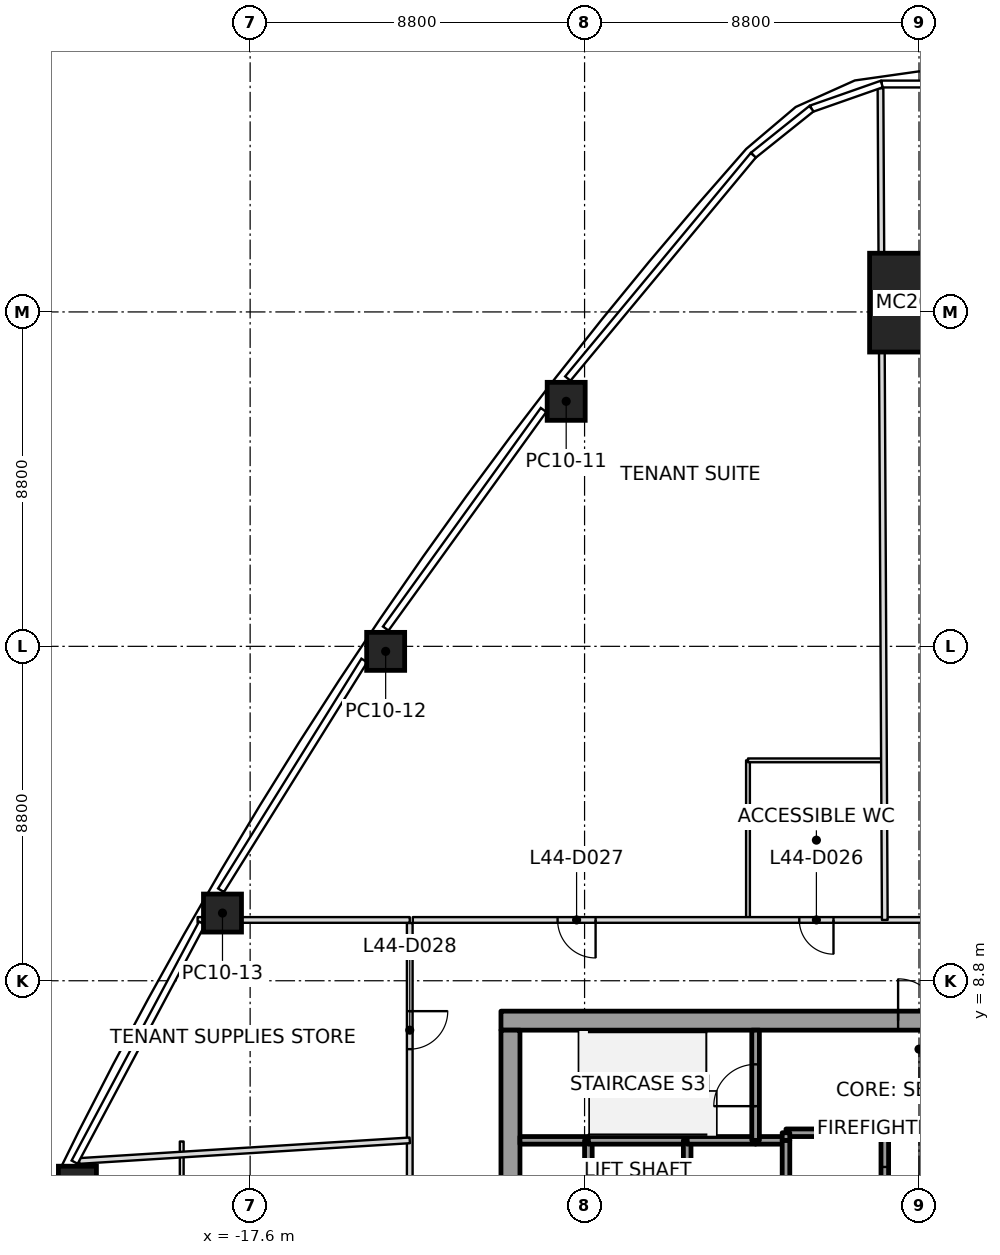
"""IFC4 building model, lengths in metres.
Left out: names, types, materials, properties, quantities, classifications, styles, units other than length and angle.
Written with IfcOpenShell. Run it as: python <this file> out.ifc"""

import sys

from ifc_helpers import new_model, si_unit, direction, frame, frame_2d, origin, origin_2d, place, context, subcontext, project, spatial, rectangle, extrude, element, fill, save


model = new_model("IFC4")
c1 = context("Model", 3, precision=1e-05, world=origin(), true_north=direction((0.0, 1.0)))
c2 = subcontext(c1, "Body", "Model", "MODEL_VIEW")
j1 = project(units=[si_unit("LENGTHUNIT", "METRE"), si_unit("PLANEANGLEUNIT", "RADIAN")], contexts=[c1])
p1 = place(None, origin())
s1 = spatial("IfcSite", under=j1, at=p1, CompositionType="ELEMENT")
p2 = place(p1, origin())
s2 = spatial("IfcBuilding", under=s1, at=p2, CompositionType="ELEMENT")
p3 = place(p2, frame((0.0, 0.0, 197.8)))
s3 = spatial("IfcBuildingStorey", under=s2, at=p3, CompositionType="ELEMENT", Elevation=197.8)
p4 = place(p3, frame((0.0, 26.645, 0.0), z_axis=(0.0, -0.032331720729, 0.999477193254), x_axis=(1.0, 0.0, 0.0)))
e1 = element("IfcColumn", 1, at=p4, inside=s3, PredefinedType="COLUMN", context=c2, shape_type="SweptSolid", body=[
    extrude(rectangle(XDim=2.6, YDim=2.6, at=origin_2d()), origin(), (0.0, 0.0, 1.0), 4.002),
])
p5 = place(p3, frame((-9.284, 24.048, 0.0), z_axis=(0.000183067202, -0.020442504242, 0.999791013416), x_axis=(0.612482198011, 0.790321478111, 0.016047378453)))
e2 = element("IfcColumn", 2, at=p5, inside=s3, PredefinedType="COLUMN", context=c2, shape_type="SweptSolid", body=[
    extrude(rectangle(XDim=1.0, YDim=1.0, at=origin_2d()), origin(), (0.0, 0.0, 1.0), 4.001),
])
p6 = place(p3, frame((-14.034, 17.468, 0.0), z_axis=(0.005248490815, -0.013243284963, 0.999898529226), x_axis=(0.557514318563, 0.830128114569, 0.008068333097)))
e3 = element("IfcColumn", 3, at=p6, inside=s3, PredefinedType="COLUMN", context=c2, shape_type="SweptSolid", body=[
    extrude(rectangle(XDim=1.0, YDim=1.0, at=origin_2d()), origin(), (0.0, 0.0, 1.0), 4.0),
])
p7 = place(p3, frame((-18.328, 10.581, 0.0), z_axis=(0.009887052741, -0.005675900648, 0.999935013058), x_axis=(0.49997556095, 0.866039512773, -2.7732311e-05)))
e4 = element("IfcColumn", 4, at=p7, inside=s3, PredefinedType="COLUMN", context=c2, shape_type="SweptSolid", body=[
    extrude(rectangle(XDim=1.0, YDim=1.0, at=origin_2d()), origin(), (0.0, 0.0, 1.0), 4.0),
])
p8 = place(p3, frame((-22.145, 3.42, 0.0), z_axis=(0.014097691364, 0.002013955909, 0.999898594398), x_axis=(0.440136782455, 0.897894975927, -0.008014046079)))
e5 = element("IfcColumn", 5, at=p8, inside=s3, PredefinedType="COLUMN", context=c2, shape_type="SweptSolid", body=[
    extrude(rectangle(XDim=1.0, YDim=1.0, at=origin_2d()), origin(), (0.0, 0.0, 1.0), 4.0),
])
p9 = place(p3, frame((-11.0, 7.75, 0.0), z_axis=(0.0, 0.0, 1.0), x_axis=(1.0, 0.0, 0.0)))
e6 = element("IfcWall", 6, at=p9, inside=s3, PredefinedType="SHEAR", context=c2, shape_type="SweptSolid", body=[
    extrude(rectangle(XDim=22.0, YDim=0.5, at=frame_2d((11.0, 0.0))), origin(), (0.0, 0.0, 1.0), 4.0),
])
p10 = place(p9, frame((10.45, 0.0, 0.0)))
e7 = element("IfcOpeningElement", 7, at=p10, cuts=e6, PredefinedType="OPENING", context=c2, shape_type="SweptSolid", body=[
    extrude(rectangle(XDim=1.1, YDim=2.1, at=frame_2d((0.55, 1.05))), frame((0.0, 0.25, 0.0), z_axis=(0.0, -1.0, 0.0), x_axis=(1.0, 0.0, 0.0)), (0.0, 0.0, 1.0), 0.5),
])
p11 = place(p3, frame((-10.75, -7.5, 0.0), z_axis=(0.0, 0.0, 1.0), x_axis=(0.0, 1.0, 0.0)))
e8 = element("IfcWall", 8, at=p11, inside=s3, PredefinedType="SHEAR", context=c2, shape_type="SweptSolid", body=[
    extrude(rectangle(XDim=15.0, YDim=0.5, at=frame_2d((7.5, 0.0))), origin(), (0.0, 0.0, 1.0), 4.0),
])
p12 = place(p11, frame((6.6, 0.0, 0.0)))
e9 = element("IfcOpeningElement", 9, at=p12, cuts=e8, PredefinedType="OPENING", context=c2, shape_type="SweptSolid", body=[
    extrude(rectangle(XDim=1.8, YDim=2.1, at=frame_2d((0.9, 1.05))), frame((0.0, 0.25, 0.0), z_axis=(0.0, -1.0, 0.0), x_axis=(1.0, 0.0, 0.0)), (0.0, 0.0, 1.0), 0.5),
])
p13 = place(p3, frame((-8.7, 4.6, 0.0), z_axis=(0.0, 0.0, 1.0), x_axis=(-1.0, 0.0, 0.0)))
e10 = element("IfcWall", 10, at=p13, inside=s3, PredefinedType="SOLIDWALL", context=c2, shape_type="SweptSolid", body=[
    extrude(rectangle(XDim=1.8, YDim=0.2, at=frame_2d((0.9, 0.0))), origin(), (0.0, 0.0, 1.0), 3.85),
])
p14 = place(p3, frame((-8.7, 1.8, 0.0), z_axis=(0.0, 0.0, 1.0), x_axis=(0.0, 1.0, 0.0)))
e11 = element("IfcWall", 11, at=p14, inside=s3, PredefinedType="SOLIDWALL", context=c2, shape_type="SweptSolid", body=[
    extrude(rectangle(XDim=2.8, YDim=0.2, at=frame_2d((1.4, 0.0))), origin(), (0.0, 0.0, 1.0), 3.85),
])
p15 = place(p3, frame((-6.1, 4.6, 0.0), z_axis=(0.0, 0.0, 1.0), x_axis=(-1.0, 0.0, 0.0)))
e12 = element("IfcWall", 12, at=p15, inside=s3, PredefinedType="SOLIDWALL", context=c2, shape_type="SweptSolid", body=[
    extrude(rectangle(XDim=2.6, YDim=0.2, at=frame_2d((1.3, 0.0))), origin(), (0.0, 0.0, 1.0), 3.85),
])
p16 = place(p3, frame((-6.1, 1.8, 0.0), z_axis=(0.0, 0.0, 1.0), x_axis=(0.0, 1.0, 0.0)))
e13 = element("IfcWall", 13, at=p16, inside=s3, PredefinedType="SOLIDWALL", context=c2, shape_type="SweptSolid", body=[
    extrude(rectangle(XDim=2.8, YDim=0.2, at=frame_2d((1.4, 0.0))), origin(), (0.0, 0.0, 1.0), 3.85),
])
p17 = place(p3, frame((-4.3, 4.6, 0.0), z_axis=(0.0, 0.0, 1.0), x_axis=(-1.0, 0.0, 0.0)))
e14 = element("IfcWall", 14, at=p17, inside=s3, PredefinedType="SOLIDWALL", context=c2, shape_type="SweptSolid", body=[
    extrude(rectangle(XDim=1.8, YDim=0.2, at=frame_2d((0.9, 0.0))), origin(), (0.0, 0.0, 1.0), 3.85),
])
p18 = place(p3, frame((-3.5, 4.6, 0.0), z_axis=(0.0, 0.0, 1.0), x_axis=(-1.0, 0.0, 0.0)))
e15 = element("IfcWall", 15, at=p18, inside=s3, PredefinedType="SOLIDWALL", context=c2, shape_type="SweptSolid", body=[
    extrude(rectangle(XDim=0.8, YDim=0.2, at=frame_2d((0.4, 0.0))), origin(), (0.0, 0.0, 1.0), 3.85),
])
p19 = place(p3, frame((-4.3, 4.6, 0.0), z_axis=(0.0, 0.0, 1.0), x_axis=(0.0, 1.0, 0.0)))
e16 = element("IfcWall", 16, at=p19, inside=s3, PredefinedType="SOLIDWALL", context=c2, shape_type="SweptSolid", body=[
    extrude(rectangle(XDim=2.9, YDim=0.2, at=frame_2d((1.45, 0.0))), origin(), (0.0, 0.0, 1.0), 3.85),
])
p20 = place(p19, frame((0.9, 0.0, 0.0)))
e17 = element("IfcOpeningElement", 17, at=p20, cuts=e16, PredefinedType="OPENING", context=c2, shape_type="SweptSolid", body=[
    extrude(rectangle(XDim=1.1, YDim=2.1, at=frame_2d((0.55, 1.05))), frame((0.0, 0.1, 0.0), z_axis=(0.0, -1.0, 0.0), x_axis=(1.0, 0.0, 0.0)), (0.0, 0.0, 1.0), 0.2),
])
p21 = place(p3, frame((-3.5, 4.6, 0.0), z_axis=(0.0, 0.0, 1.0), x_axis=(0.0, -1.0, 0.0)))
e18 = element("IfcWall", 18, at=p21, inside=s3, PredefinedType="SOLIDWALL", context=c2, shape_type="SweptSolid", body=[
    extrude(rectangle(XDim=2.8, YDim=0.2, at=frame_2d((1.4, 0.0))), origin(), (0.0, 0.0, 1.0), 3.85),
])
p22 = place(p3, frame((-0.9, 1.8, 0.0), z_axis=(0.0, 0.0, 1.0), x_axis=(0.0, 1.0, 0.0)))
e19 = element("IfcWall", 19, at=p22, inside=s3, PredefinedType="SOLIDWALL", context=c2, shape_type="SweptSolid", body=[
    extrude(rectangle(XDim=3.0, YDim=0.2, at=frame_2d((1.5, 0.0))), origin(), (0.0, 0.0, 1.0), 3.85),
])
p23 = place(p22, frame((0.9, 0.0, 0.0)))
e20 = element("IfcOpeningElement", 20, at=p23, cuts=e19, PredefinedType="OPENING", context=c2, shape_type="SweptSolid", body=[
    extrude(rectangle(XDim=1.2, YDim=2.1, at=frame_2d((0.6, 1.05))), frame((0.0, 0.1, 0.0), z_axis=(0.0, -1.0, 0.0), x_axis=(1.0, 0.0, 0.0)), (0.0, 0.0, 1.0), 0.2),
])
p24 = place(p3, frame((-0.9, 4.8, 0.0), z_axis=(0.0, 0.0, 1.0), x_axis=(-1.0, 0.0, 0.0)))
e21 = element("IfcWall", 21, at=p24, inside=s3, PredefinedType="SOLIDWALL", context=c2, shape_type="SweptSolid", body=[
    extrude(rectangle(XDim=2.6, YDim=0.2, at=frame_2d((1.3, 0.0))), origin(), (0.0, 0.0, 1.0), 3.85),
])
p25 = place(p3, frame((-3.5, 4.8, 0.0), z_axis=(0.0, 0.0, 1.0), x_axis=(0.0, -1.0, 0.0)))
e22 = element("IfcWall", 22, at=p25, inside=s3, PredefinedType="SOLIDWALL", context=c2, shape_type="SweptSolid", body=[
    extrude(rectangle(XDim=0.2, YDim=0.2, at=frame_2d((0.1, 0.0))), origin(), (0.0, 0.0, 1.0), 3.85),
])
p26 = place(p3, frame((-13.4, 4.6, 0.0), z_axis=(0.0, 0.0, 1.0), x_axis=(-0.998057152045, -0.062305066026, 0.0)))
e23 = element("IfcWall", 23, at=p26, inside=s3, PredefinedType="PARTITIONING", context=c2, shape_type="SweptSolid", body=[
    extrude(rectangle(XDim=8.719, YDim=0.15, at=frame_2d((4.359, 0.0))), origin(), (0.0, 0.0, 1.0), 3.234),
])
p27 = place(p3, frame((-13.4, 10.4, 0.0), z_axis=(0.0, 0.0, 1.0), x_axis=(-1.0, 0.0, 0.0)))
e24 = element("IfcWall", 24, at=p27, inside=s3, PredefinedType="PARTITIONING", context=c2, shape_type="SweptSolid", body=[
    extrude(rectangle(XDim=5.582, YDim=0.15, at=frame_2d((2.791, 0.0))), origin(), (0.0, 0.0, 1.0), 3.45),
])
p28 = place(p3, frame((-0.9, 10.4, 0.0), z_axis=(0.0, 0.0, 1.0), x_axis=(-0.005175902557, 0.999986604927, 0.0)))
e25 = element("IfcWall", 25, at=p28, inside=s3, PredefinedType="PARTITIONING", context=c2, shape_type="SweptSolid", body=[
    extrude(rectangle(XDim=21.886, YDim=0.15, at=frame_2d((10.943, 0.0))), origin(), (0.0, 0.0, 1.0), 3.234),
])
p29 = place(p3, frame((-13.4, 10.32, 0.0), z_axis=(0.0, 0.0, 1.0), x_axis=(0.0, -1.0, 0.0)))
e26 = element("IfcWall", 26, at=p29, inside=s3, PredefinedType="PARTITIONING", context=c2, shape_type="SweptSolid", body=[
    extrude(rectangle(XDim=20.64, YDim=0.15, at=frame_2d((10.32, 0.0))), origin(), (0.0, 0.0, 1.0), 3.166),
])
p30 = place(p29, frame((2.32, 0.0, 0.0)))
e27 = element("IfcOpeningElement", 27, at=p30, cuts=e26, PredefinedType="OPENING", context=c2, shape_type="SweptSolid", body=[
    extrude(rectangle(XDim=1.0, YDim=2.1, at=frame_2d((0.5, 1.05))), frame((0.0, 0.075, 0.0), z_axis=(0.0, -1.0, 0.0), x_axis=(1.0, 0.0, 0.0)), (0.0, 0.0, 1.0), 0.15),
])
p31 = place(p29, frame((7.77, 0.0, 0.0)))
e28 = element("IfcOpeningElement", 28, at=p31, cuts=e26, PredefinedType="OPENING", context=c2, shape_type="SweptSolid", body=[
    extrude(rectangle(XDim=0.9, YDim=2.1, at=frame_2d((0.45, 1.05))), frame((0.0, 0.075, 0.0), z_axis=(0.0, -1.0, 0.0), x_axis=(1.0, 0.0, 0.0)), (0.0, 0.0, 1.0), 0.15),
])
p32 = place(p29, frame((15.28, 0.0, 0.0)))
e29 = element("IfcOpeningElement", 29, at=p32, cuts=e26, PredefinedType="OPENING", context=c2, shape_type="SweptSolid", body=[
    extrude(rectangle(XDim=1.0, YDim=2.1, at=frame_2d((0.5, 1.05))), frame((0.0, 0.075, 0.0), z_axis=(0.0, -1.0, 0.0), x_axis=(1.0, 0.0, 0.0)), (0.0, 0.0, 1.0), 0.15),
])
p33 = place(p3, frame((13.32, 10.4, 0.0), z_axis=(0.0, 0.0, 1.0), x_axis=(-1.0, 0.0, 0.0)))
e30 = element("IfcWall", 30, at=p33, inside=s3, PredefinedType="PARTITIONING", context=c2, shape_type="SweptSolid", body=[
    extrude(rectangle(XDim=26.64, YDim=0.15, at=frame_2d((13.32, 0.0))), origin(), (0.0, 0.0, 1.0), 3.166),
])
p34 = place(p33, frame((1.95, 0.0, 0.0)))
e31 = element("IfcOpeningElement", 31, at=p34, cuts=e30, PredefinedType="OPENING", context=c2, shape_type="SweptSolid", body=[
    extrude(rectangle(XDim=0.9, YDim=2.1, at=frame_2d((0.45, 1.05))), frame((0.0, 0.075, 0.0), z_axis=(0.0, -1.0, 0.0), x_axis=(1.0, 0.0, 0.0)), (0.0, 0.0, 1.0), 0.15),
])
p35 = place(p33, frame((9.11, 0.0, 0.0)))
e32 = element("IfcOpeningElement", 32, at=p35, cuts=e30, PredefinedType="OPENING", context=c2, shape_type="SweptSolid", body=[
    extrude(rectangle(XDim=1.0, YDim=2.1, at=frame_2d((0.5, 1.05))), frame((0.0, 0.075, 0.0), z_axis=(0.0, -1.0, 0.0), x_axis=(1.0, 0.0, 0.0)), (0.0, 0.0, 1.0), 0.15),
])
p36 = place(p33, frame((15.57, 0.0, 0.0)))
e33 = element("IfcOpeningElement", 33, at=p36, cuts=e30, PredefinedType="OPENING", context=c2, shape_type="SweptSolid", body=[
    extrude(rectangle(XDim=0.9, YDim=2.1, at=frame_2d((0.45, 1.05))), frame((0.0, 0.075, 0.0), z_axis=(0.0, -1.0, 0.0), x_axis=(1.0, 0.0, 0.0)), (0.0, 0.0, 1.0), 0.15),
])
p37 = place(p33, frame((21.83, 0.0, 0.0)))
e34 = element("IfcOpeningElement", 34, at=p37, cuts=e30, PredefinedType="OPENING", context=c2, shape_type="SweptSolid", body=[
    extrude(rectangle(XDim=1.0, YDim=2.1, at=frame_2d((0.5, 1.05))), frame((0.0, 0.075, 0.0), z_axis=(0.0, -1.0, 0.0), x_axis=(1.0, 0.0, 0.0)), (0.0, 0.0, 1.0), 0.15),
])
p38 = place(p3, frame((-19.4, -0.4, 0.0), z_axis=(0.0, 0.0, 1.0), x_axis=(0.0, 1.0, 0.0)))
e35 = element("IfcWall", 35, at=p38, inside=s3, PredefinedType="PARTITIONING", context=c2, shape_type="SweptSolid", body=[
    extrude(rectangle(XDim=4.97, YDim=0.1, at=frame_2d((2.485, 0.0))), origin(), (0.0, 0.0, 1.0), 3.45),
])
p39 = place(p3, frame((-4.5, 10.43, 0.0), z_axis=(0.0, 0.0, 1.0), x_axis=(0.0, 1.0, 0.0)))
e36 = element("IfcWall", 36, at=p39, inside=s3, PredefinedType="PARTITIONING", context=c2, shape_type="SweptSolid", body=[
    extrude(rectangle(XDim=4.17, YDim=0.1, at=frame_2d((2.085, 0.0))), origin(), (0.0, 0.0, 1.0), 3.45),
])
p40 = place(p3, frame((-4.5, 14.6, 0.0), z_axis=(0.0, 0.0, 1.0), x_axis=(1.0, 0.0, 0.0)))
e37 = element("IfcWall", 37, at=p40, inside=s3, PredefinedType="PARTITIONING", context=c2, shape_type="SweptSolid", body=[
    extrude(rectangle(XDim=3.57, YDim=0.1, at=frame_2d((1.785, 0.0))), origin(), (0.0, 0.0, 1.0), 3.317),
])
p41 = place(p36, origin())
e38 = element("IfcDoor", 38, at=p41, inside=s3, OperationType="SINGLE_SWING_RIGHT", PredefinedType="DOOR", context=c2, shape_type="SweptSolid", body=[
    extrude(rectangle(XDim=0.9, YDim=2.1, at=frame_2d((0.45, 1.05))), frame((0.0, 0.025, 0.0), z_axis=(0.0, -1.0, 0.0), x_axis=(1.0, 0.0, 0.0)), (0.0, 0.0, 1.0), 0.05),
])
fill(e33, e38)
p42 = place(p37, origin())
e39 = element("IfcDoor", 39, at=p42, inside=s3, OperationType="SINGLE_SWING_LEFT", PredefinedType="DOOR", context=c2, shape_type="SweptSolid", body=[
    extrude(rectangle(XDim=1.0, YDim=2.1, at=frame_2d((0.5, 1.05))), frame((0.0, 0.025, 0.0), z_axis=(0.0, -1.0, 0.0), x_axis=(1.0, 0.0, 0.0)), (0.0, 0.0, 1.0), 0.05),
])
fill(e34, e39)
p43 = place(p30, origin())
e40 = element("IfcDoor", 40, at=p43, inside=s3, OperationType="SINGLE_SWING_RIGHT", PredefinedType="DOOR", context=c2, shape_type="SweptSolid", body=[
    extrude(rectangle(XDim=1.0, YDim=2.1, at=frame_2d((0.5, 1.05))), frame((0.0, 0.025, 0.0), z_axis=(0.0, -1.0, 0.0), x_axis=(1.0, 0.0, 0.0)), (0.0, 0.0, 1.0), 0.05),
])
fill(e27, e40)
p44 = place(p23, origin())
e41 = element("IfcDoor", 41, at=p44, inside=s3, OperationType="SLIDING_TO_LEFT", PredefinedType="DOOR", context=c2, shape_type="SweptSolid", body=[
    extrude(rectangle(XDim=1.2, YDim=2.1, at=frame_2d((0.6, 1.05))), frame((0.0, 0.025, 0.0), z_axis=(0.0, -1.0, 0.0), x_axis=(1.0, 0.0, 0.0)), (0.0, 0.0, 1.0), 0.05),
])
fill(e20, e41)
p45 = place(p20, origin())
e42 = element("IfcDoor", 42, at=p45, inside=s3, OperationType="SINGLE_SWING_RIGHT", PredefinedType="DOOR", context=c2, shape_type="SweptSolid", body=[
    extrude(rectangle(XDim=1.1, YDim=2.1, at=frame_2d((0.55, 1.05))), frame((0.0, 0.025, 0.0), z_axis=(0.0, -1.0, 0.0), x_axis=(1.0, 0.0, 0.0)), (0.0, 0.0, 1.0), 0.05),
])
fill(e17, e42)
p46 = place(p10, origin())
e43 = element("IfcDoor", 43, at=p46, inside=s3, OperationType="SINGLE_SWING_RIGHT", PredefinedType="DOOR", context=c2, shape_type="SweptSolid", body=[
    extrude(rectangle(XDim=1.1, YDim=2.1, at=frame_2d((0.55, 1.05))), frame((0.0, 0.025, 0.0), z_axis=(0.0, -1.0, 0.0), x_axis=(1.0, 0.0, 0.0)), (0.0, 0.0, 1.0), 0.05),
])
fill(e7, e43)
save(model, sys.argv[1])
